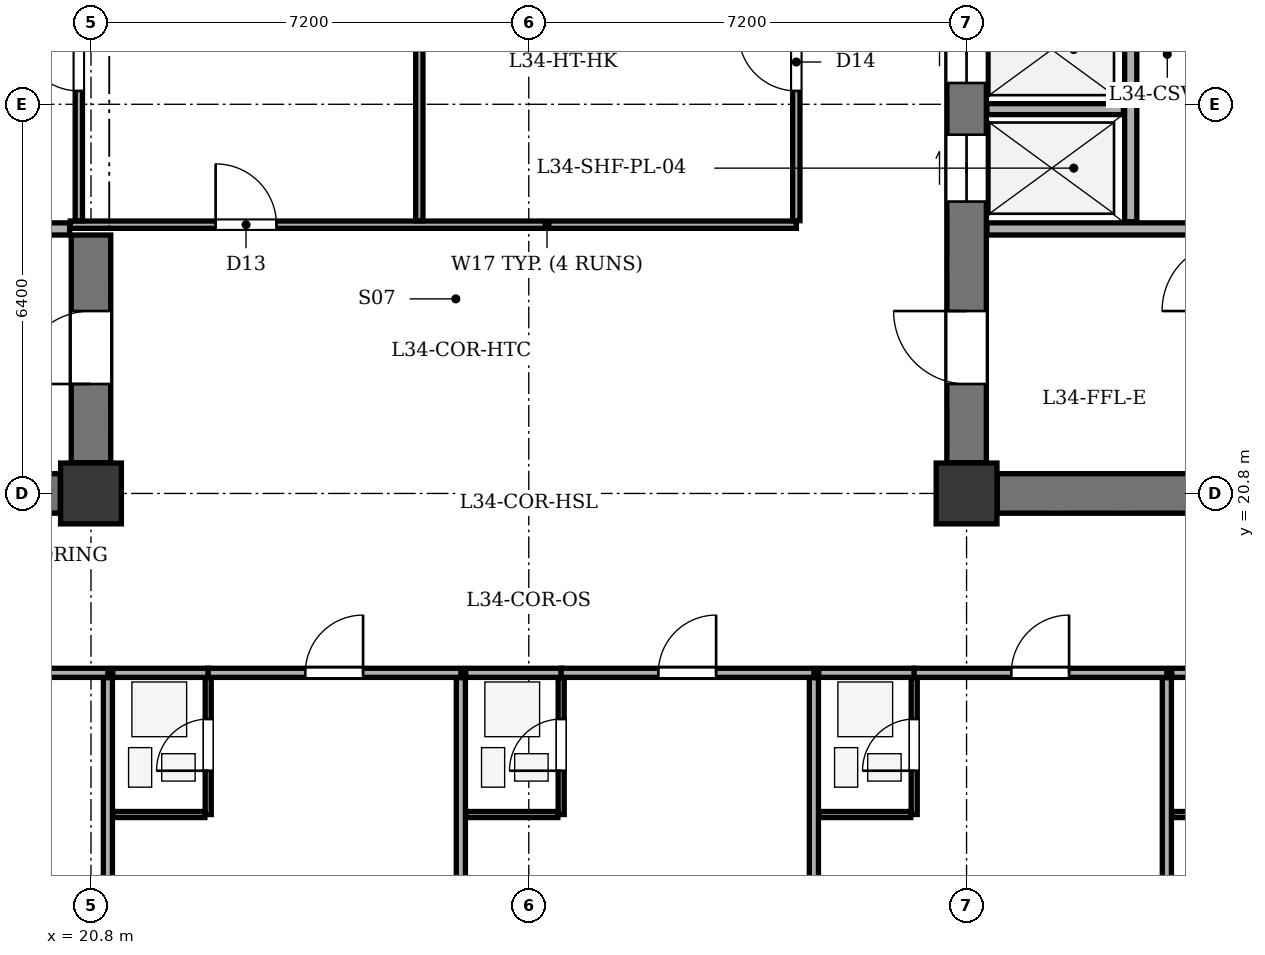
"""IFC4 building model, lengths in metres.
Left out: names, types, materials, properties, quantities, classifications, styles, units other than length and angle.
Written with IfcOpenShell. Run it as: python <this file> out.ifc"""

import sys

from ifc_helpers import new_model, si_unit, direction, frame, frame_2d, origin, origin_2d, place, context, subcontext, project, spatial, rectangle, extrude, element, fill, save


model = new_model("IFC4")
c1 = context("Model", 3, precision=1e-05, world=origin(), true_north=direction((0.0, 1.0)))
c2 = subcontext(c1, "Body", "Model", "MODEL_VIEW")
j1 = project(units=[si_unit("LENGTHUNIT", "METRE"), si_unit("PLANEANGLEUNIT", "RADIAN")], contexts=[c1])
p1 = place(None, origin())
s1 = spatial("IfcSite", under=j1, at=p1, CompositionType="ELEMENT")
p2 = place(p1, origin())
s2 = spatial("IfcBuilding", under=s1, at=p2, CompositionType="ELEMENT")
p3 = place(p2, frame((0.0, 0.0, 137.8)))
s3 = spatial("IfcBuildingStorey", under=s2, at=p3, CompositionType="ELEMENT", Elevation=137.8)
for number, where, z_axis, x_axis in (
    (1, (20.8, 20.8, 0.0), (0.0, 0.0, 1.0), (1.0, 0.0, 0.0)),
    (2, (35.2, 20.8, 0.0), (0.0, 0.0, 1.0), (1.0, 0.0, 0.0)),
):
    element("IfcColumn", number, at=place(p3, frame(where, z_axis=z_axis, x_axis=x_axis)), inside=s3, PredefinedType="COLUMN", context=c2, shape_type="SweptSolid", body=[
        extrude(rectangle(XDim=1.0, YDim=1.0, at=origin_2d()), origin(), (0.0, 0.0, 1.0), 3.5),
    ])
p4 = place(p3, frame((13.305, 20.8, 0.0), z_axis=(0.0, 0.0, 1.0), x_axis=(1.0, 0.0, 0.0)))
e3 = element("IfcWall", 3, at=p4, inside=s3, PredefinedType="SHEAR", context=c2, shape_type="SweptSolid", body=[
    extrude(rectangle(XDim=6.99, YDim=0.65, at=frame_2d((3.495, 0.0))), origin(), (0.0, 0.0, 1.0), 3.05),
])
p5 = place(p3, frame((20.8, 21.305, 0.0), z_axis=(0.0, 0.0, 1.0), x_axis=(0.0, 1.0, 0.0)))
e4 = element("IfcWall", 4, at=p5, inside=s3, PredefinedType="SHEAR", context=c2, shape_type="SweptSolid", body=[
    extrude(rectangle(XDim=3.745, YDim=0.65, at=frame_2d((1.873, 0.0))), origin(), (0.0, 0.0, 1.0), 3.05),
])
p6 = place(p5, frame((1.295, 0.0, 0.0)))
e5 = element("IfcOpeningElement", 5, at=p6, cuts=e4, PredefinedType="OPENING", context=c2, shape_type="SweptSolid", body=[
    extrude(rectangle(XDim=1.2, YDim=2.15, at=frame_2d((0.6, 1.075))), frame((0.0, 0.335, 0.0), z_axis=(0.0, -1.0, 0.0), x_axis=(1.0, 0.0, 0.0)), (0.0, 0.0, 1.0), 0.67),
])
p7 = place(p3, frame((16.6, 25.15, 0.0), z_axis=(0.0, 0.0, 1.0), x_axis=(1.0, 0.0, 0.0)))
e6 = element("IfcWall", 6, at=p7, inside=s3, PredefinedType="SOLIDWALL", context=c2, shape_type="SweptSolid", body=[
    extrude(rectangle(XDim=3.85, YDim=0.2, at=frame_2d((1.925, 0.0))), origin(), (0.0, 0.0, 1.0), 3.05),
])
p8 = place(p3, frame((35.705, 20.8, 0.0), z_axis=(0.0, 0.0, 1.0), x_axis=(1.0, 0.0, 0.0)))
e7 = element("IfcWall", 7, at=p8, inside=s3, PredefinedType="SHEAR", context=c2, shape_type="SweptSolid", body=[
    extrude(rectangle(XDim=6.99, YDim=0.65, at=frame_2d((3.495, 0.0))), origin(), (0.0, 0.0, 1.0), 3.05),
])
p9 = place(p3, frame((35.2, 21.305, 0.0), z_axis=(0.0, 0.0, 1.0), x_axis=(0.0, 1.0, 0.0)))
e8 = element("IfcWall", 8, at=p9, inside=s3, PredefinedType="SHEAR", context=c2, shape_type="SweptSolid", body=[
    extrude(rectangle(XDim=11.79, YDim=0.65, at=frame_2d((5.895, 0.0))), origin(), (0.0, 0.0, 1.0), 3.05),
])
p10 = place(p9, frame((1.295, 0.0, 0.0)))
e9 = element("IfcOpeningElement", 9, at=p10, cuts=e8, PredefinedType="OPENING", context=c2, shape_type="SweptSolid", body=[
    extrude(rectangle(XDim=1.2, YDim=2.15, at=frame_2d((0.6, 1.075))), frame((0.0, 0.335, 0.0), z_axis=(0.0, -1.0, 0.0), x_axis=(1.0, 0.0, 0.0)), (0.0, 0.0, 1.0), 0.67),
])
p11 = place(p9, frame((4.295, 0.0, 0.0)))
e10 = element("IfcOpeningElement", 10, at=p11, cuts=e8, PredefinedType="OPENING", context=c2, shape_type="SweptSolid", body=[
    extrude(rectangle(XDim=1.1, YDim=2.1, at=frame_2d((0.55, 1.05))), frame((0.0, 0.335, 0.0), z_axis=(0.0, -1.0, 0.0), x_axis=(1.0, 0.0, 0.0)), (0.0, 0.0, 1.0), 0.67),
])
p12 = place(p9, frame((6.245, 0.0, 0.0)))
e11 = element("IfcOpeningElement", 11, at=p12, cuts=e8, PredefinedType="OPENING", context=c2, shape_type="SweptSolid", body=[
    extrude(rectangle(XDim=1.1, YDim=2.1, at=frame_2d((0.55, 1.05))), frame((0.0, 0.335, 0.0), z_axis=(0.0, -1.0, 0.0), x_axis=(1.0, 0.0, 0.0)), (0.0, 0.0, 1.0), 0.67),
])
p13 = place(p9, frame((8.195, 0.0, 0.0)))
e12 = element("IfcOpeningElement", 12, at=p13, cuts=e8, PredefinedType="OPENING", context=c2, shape_type="SweptSolid", body=[
    extrude(rectangle(XDim=1.1, YDim=2.1, at=frame_2d((0.55, 1.05))), frame((0.0, 0.335, 0.0), z_axis=(0.0, -1.0, 0.0), x_axis=(1.0, 0.0, 0.0)), (0.0, 0.0, 1.0), 0.67),
])
p14 = place(p3, frame((35.535, 25.15, 0.0), z_axis=(0.0, 0.0, 1.0), x_axis=(1.0, 0.0, 0.0)))
e13 = element("IfcWall", 13, at=p14, inside=s3, PredefinedType="SOLIDWALL", context=c2, shape_type="SweptSolid", body=[
    extrude(rectangle(XDim=3.865, YDim=0.2, at=frame_2d((1.933, 0.0))), origin(), (0.0, 0.0, 1.0), 3.05),
])
p15 = place(p3, frame((37.9, 25.27, 0.0), z_axis=(0.0, 0.0, 1.0), x_axis=(0.0, 1.0, 0.0)))
e14 = element("IfcWall", 14, at=p15, inside=s3, PredefinedType="SOLIDWALL", context=c2, shape_type="SweptSolid", body=[
    extrude(rectangle(XDim=7.995, YDim=0.2, at=frame_2d((3.998, 0.0))), origin(), (0.0, 0.0, 1.0), 3.05),
])
p16 = place(p3, frame((35.535, 27.12, 0.0), z_axis=(0.0, 0.0, 1.0), x_axis=(1.0, 0.0, 0.0)))
e15 = element("IfcWall", 15, at=p16, inside=s3, PredefinedType="PARTITIONING", context=c2, shape_type="SweptSolid", body=[
    extrude(rectangle(XDim=2.245, YDim=0.18, at=frame_2d((1.123, 0.0))), origin(), (0.0, 0.0, 1.0), 3.05),
])
p17 = place(p3, frame((20.46, 25.22, 0.0), z_axis=(0.0, 0.0, 1.0), x_axis=(1.0, 0.0, 0.0)))
e16 = element("IfcWall", 16, at=p17, inside=s3, PredefinedType="PARTITIONING", context=c2, shape_type="SweptSolid", body=[
    extrude(rectangle(XDim=11.94, YDim=0.12, at=frame_2d((5.97, 0.0))), origin(), (0.0, 0.0, 1.0), 3.05),
])
p18 = place(p17, frame((2.39, 0.0, 0.0)))
e17 = element("IfcOpeningElement", 17, at=p18, cuts=e16, PredefinedType="OPENING", context=c2, shape_type="SweptSolid", body=[
    extrude(rectangle(XDim=1.0, YDim=2.1, at=frame_2d((0.5, 1.05))), frame((0.0, 0.07, 0.0), z_axis=(0.0, -1.0, 0.0), x_axis=(1.0, 0.0, 0.0)), (0.0, 0.0, 1.0), 0.14),
])
p19 = place(p3, frame((32.4, 25.285, 0.0), z_axis=(0.0, 0.0, 1.0), x_axis=(0.0, 1.0, 0.0)))
e18 = element("IfcWall", 18, at=p19, inside=s3, PredefinedType="PARTITIONING", context=c2, shape_type="SweptSolid", body=[
    extrude(rectangle(XDim=5.67, YDim=0.12, at=frame_2d((2.835, 0.0))), origin(), (0.0, 0.0, 1.0), 3.05),
])
p20 = place(p19, frame((2.135, 0.0, 0.0)))
e19 = element("IfcOpeningElement", 19, at=p20, cuts=e18, PredefinedType="OPENING", context=c2, shape_type="SweptSolid", body=[
    extrude(rectangle(XDim=0.95, YDim=2.1, at=frame_2d((0.475, 1.05))), frame((0.0, 0.07, 0.0), z_axis=(0.0, -1.0, 0.0), x_axis=(1.0, 0.0, 0.0)), (0.0, 0.0, 1.0), 0.14),
])
p21 = place(p3, frame((20.6, 25.285, 0.0), z_axis=(0.0, 0.0, 1.0), x_axis=(0.0, 1.0, 0.0)))
e20 = element("IfcWall", 20, at=p21, inside=s3, PredefinedType="PARTITIONING", context=c2, shape_type="SweptSolid", body=[
    extrude(rectangle(XDim=5.67, YDim=0.12, at=frame_2d((2.835, 0.0))), origin(), (0.0, 0.0, 1.0), 2.585),
])
p22 = place(p21, frame((2.135, 0.0, 0.0)))
e21 = element("IfcOpeningElement", 21, at=p22, cuts=e20, PredefinedType="OPENING", context=c2, shape_type="SweptSolid", body=[
    extrude(rectangle(XDim=0.95, YDim=2.1, at=frame_2d((0.475, 1.05))), frame((0.0, 0.07, 0.0), z_axis=(0.0, -1.0, 0.0), x_axis=(1.0, 0.0, 0.0)), (0.0, 0.0, 1.0), 0.14),
])
p23 = place(p3, frame((26.2, 25.285, 0.0), z_axis=(0.0, 0.0, 1.0), x_axis=(0.0, 1.0, 0.0)))
e22 = element("IfcWall", 22, at=p23, inside=s3, PredefinedType="PARTITIONING", context=c2, shape_type="SweptSolid", body=[
    extrude(rectangle(XDim=5.67, YDim=0.12, at=frame_2d((2.835, 0.0))), origin(), (0.0, 0.0, 1.0), 3.05),
])
p24 = place(p3, frame((17.264, 17.85, 0.0), z_axis=(0.0, 0.0, 1.0), x_axis=(1.0, 0.0, 0.0)))
e23 = element("IfcWall", 23, at=p24, inside=s3, PredefinedType="PARTITIONING", context=c2, shape_type="SweptSolid", body=[
    extrude(rectangle(XDim=3.814, YDim=0.15, at=frame_2d((1.907, 0.0))), origin(), (0.0, 0.0, 1.0), 3.05),
])
p25 = place(p24, frame((1.427, 0.0, 0.0)))
e24 = element("IfcOpeningElement", 24, at=p25, cuts=e23, PredefinedType="OPENING", context=c2, shape_type="SweptSolid", body=[
    extrude(rectangle(XDim=0.95, YDim=2.1, at=frame_2d((0.475, 1.05))), frame((0.0, 0.085, 0.0), z_axis=(0.0, -1.0, 0.0), x_axis=(1.0, 0.0, 0.0)), (0.0, 0.0, 1.0), 0.17),
])
p26 = place(p3, frame((21.078, 1.875, 0.0), z_axis=(0.0, 0.0, 1.0), x_axis=(0.0, 1.0, 0.0)))
e25 = element("IfcWall", 25, at=p26, inside=s3, PredefinedType="PARTITIONING", context=c2, shape_type="SweptSolid", body=[
    extrude(rectangle(XDim=15.895, YDim=0.15, at=frame_2d((7.948, 0.0))), origin(), (0.0, 0.0, 1.0), 3.05),
])
p27 = place(p3, frame((21.158, 17.85, 0.0), z_axis=(0.0, 0.0, 1.0), x_axis=(1.0, 0.0, 0.0)))
e26 = element("IfcWall", 26, at=p27, inside=s3, PredefinedType="PARTITIONING", context=c2, shape_type="SweptSolid", body=[
    extrude(rectangle(XDim=1.57, YDim=0.15, at=frame_2d((0.785, 0.0))), origin(), (0.0, 0.0, 1.0), 3.05),
])
p28 = place(p3, frame((22.728, 17.85, 0.0), z_axis=(0.0, 0.0, 1.0), x_axis=(1.0, 0.0, 0.0)))
e27 = element("IfcWall", 27, at=p28, inside=s3, PredefinedType="PARTITIONING", context=c2, shape_type="SweptSolid", body=[
    extrude(rectangle(XDim=4.155, YDim=0.15, at=frame_2d((2.078, 0.0))), origin(), (0.0, 0.0, 1.0), 3.05),
])
p29 = place(p28, frame((1.597, 0.0, 0.0)))
e28 = element("IfcOpeningElement", 28, at=p29, cuts=e27, PredefinedType="OPENING", context=c2, shape_type="SweptSolid", body=[
    extrude(rectangle(XDim=0.95, YDim=2.1, at=frame_2d((0.475, 1.05))), frame((0.0, 0.085, 0.0), z_axis=(0.0, -1.0, 0.0), x_axis=(1.0, 0.0, 0.0)), (0.0, 0.0, 1.0), 0.17),
])
p30 = place(p3, frame((22.728, 15.52, 0.0), z_axis=(0.0, 0.0, 1.0), x_axis=(0.0, 1.0, 0.0)))
e29 = element("IfcWall", 29, at=p30, inside=s3, PredefinedType="PARTITIONING", context=c2, shape_type="SweptSolid", body=[
    extrude(rectangle(XDim=2.25, YDim=0.1, at=frame_2d((1.125, 0.0))), origin(), (0.0, 0.0, 1.0), 3.05),
])
p31 = place(p30, frame((0.72, 0.0, 0.0)))
e30 = element("IfcOpeningElement", 30, at=p31, cuts=e29, PredefinedType="OPENING", context=c2, shape_type="SweptSolid", body=[
    extrude(rectangle(XDim=0.85, YDim=2.05, at=frame_2d((0.425, 1.025))), frame((0.0, 0.06, 0.0), z_axis=(0.0, -1.0, 0.0), x_axis=(1.0, 0.0, 0.0)), (0.0, 0.0, 1.0), 0.12),
])
p32 = place(p3, frame((21.158, 15.52, 0.0), z_axis=(0.0, 0.0, 1.0), x_axis=(1.0, 0.0, 0.0)))
e31 = element("IfcWall", 31, at=p32, inside=s3, PredefinedType="PARTITIONING", context=c2, shape_type="SweptSolid", body=[
    extrude(rectangle(XDim=1.515, YDim=0.1, at=frame_2d((0.758, 0.0))), origin(), (0.0, 0.0, 1.0), 3.05),
])
p33 = place(p3, frame((26.883, 1.875, 0.0), z_axis=(0.0, 0.0, 1.0), x_axis=(0.0, 1.0, 0.0)))
e32 = element("IfcWall", 32, at=p33, inside=s3, PredefinedType="PARTITIONING", context=c2, shape_type="SweptSolid", body=[
    extrude(rectangle(XDim=15.895, YDim=0.15, at=frame_2d((7.948, 0.0))), origin(), (0.0, 0.0, 1.0), 3.05),
])
p34 = place(p3, frame((26.963, 17.85, 0.0), z_axis=(0.0, 0.0, 1.0), x_axis=(1.0, 0.0, 0.0)))
e33 = element("IfcWall", 33, at=p34, inside=s3, PredefinedType="PARTITIONING", context=c2, shape_type="SweptSolid", body=[
    extrude(rectangle(XDim=1.57, YDim=0.15, at=frame_2d((0.785, 0.0))), origin(), (0.0, 0.0, 1.0), 3.05),
])
p35 = place(p3, frame((28.533, 17.85, 0.0), z_axis=(0.0, 0.0, 1.0), x_axis=(1.0, 0.0, 0.0)))
e34 = element("IfcWall", 34, at=p35, inside=s3, PredefinedType="PARTITIONING", context=c2, shape_type="SweptSolid", body=[
    extrude(rectangle(XDim=4.156, YDim=0.15, at=frame_2d((2.078, 0.0))), origin(), (0.0, 0.0, 1.0), 3.05),
])
p36 = place(p35, frame((1.598, 0.0, 0.0)))
e35 = element("IfcOpeningElement", 35, at=p36, cuts=e34, PredefinedType="OPENING", context=c2, shape_type="SweptSolid", body=[
    extrude(rectangle(XDim=0.95, YDim=2.1, at=frame_2d((0.475, 1.05))), frame((0.0, 0.085, 0.0), z_axis=(0.0, -1.0, 0.0), x_axis=(1.0, 0.0, 0.0)), (0.0, 0.0, 1.0), 0.17),
])
p37 = place(p3, frame((28.533, 15.52, 0.0), z_axis=(0.0, 0.0, 1.0), x_axis=(0.0, 1.0, 0.0)))
e36 = element("IfcWall", 36, at=p37, inside=s3, PredefinedType="PARTITIONING", context=c2, shape_type="SweptSolid", body=[
    extrude(rectangle(XDim=2.25, YDim=0.1, at=frame_2d((1.125, 0.0))), origin(), (0.0, 0.0, 1.0), 3.05),
])
p38 = place(p37, frame((0.72, 0.0, 0.0)))
e37 = element("IfcOpeningElement", 37, at=p38, cuts=e36, PredefinedType="OPENING", context=c2, shape_type="SweptSolid", body=[
    extrude(rectangle(XDim=0.85, YDim=2.05, at=frame_2d((0.425, 1.025))), frame((0.0, 0.06, 0.0), z_axis=(0.0, -1.0, 0.0), x_axis=(1.0, 0.0, 0.0)), (0.0, 0.0, 1.0), 0.12),
])
p39 = place(p3, frame((26.963, 15.52, 0.0), z_axis=(0.0, 0.0, 1.0), x_axis=(1.0, 0.0, 0.0)))
e38 = element("IfcWall", 38, at=p39, inside=s3, PredefinedType="PARTITIONING", context=c2, shape_type="SweptSolid", body=[
    extrude(rectangle(XDim=1.515, YDim=0.1, at=frame_2d((0.758, 0.0))), origin(), (0.0, 0.0, 1.0), 3.05),
])
p40 = place(p3, frame((32.689, 1.875, 0.0), z_axis=(0.0, 0.0, 1.0), x_axis=(0.0, 1.0, 0.0)))
e39 = element("IfcWall", 39, at=p40, inside=s3, PredefinedType="PARTITIONING", context=c2, shape_type="SweptSolid", body=[
    extrude(rectangle(XDim=15.895, YDim=0.15, at=frame_2d((7.948, 0.0))), origin(), (0.0, 0.0, 1.0), 3.05),
])
p41 = place(p3, frame((32.769, 17.85, 0.0), z_axis=(0.0, 0.0, 1.0), x_axis=(1.0, 0.0, 0.0)))
e40 = element("IfcWall", 40, at=p41, inside=s3, PredefinedType="PARTITIONING", context=c2, shape_type="SweptSolid", body=[
    extrude(rectangle(XDim=1.57, YDim=0.15, at=frame_2d((0.785, 0.0))), origin(), (0.0, 0.0, 1.0), 3.05),
])
p42 = place(p3, frame((34.339, 17.85, 0.0), z_axis=(0.0, 0.0, 1.0), x_axis=(1.0, 0.0, 0.0)))
e41 = element("IfcWall", 41, at=p42, inside=s3, PredefinedType="PARTITIONING", context=c2, shape_type="SweptSolid", body=[
    extrude(rectangle(XDim=4.155, YDim=0.15, at=frame_2d((2.077, 0.0))), origin(), (0.0, 0.0, 1.0), 3.05),
])
p43 = place(p42, frame((1.597, 0.0, 0.0)))
e42 = element("IfcOpeningElement", 42, at=p43, cuts=e41, PredefinedType="OPENING", context=c2, shape_type="SweptSolid", body=[
    extrude(rectangle(XDim=0.95, YDim=2.1, at=frame_2d((0.475, 1.05))), frame((0.0, 0.085, 0.0), z_axis=(0.0, -1.0, 0.0), x_axis=(1.0, 0.0, 0.0)), (0.0, 0.0, 1.0), 0.17),
])
p44 = place(p3, frame((34.339, 15.52, 0.0), z_axis=(0.0, 0.0, 1.0), x_axis=(0.0, 1.0, 0.0)))
e43 = element("IfcWall", 43, at=p44, inside=s3, PredefinedType="PARTITIONING", context=c2, shape_type="SweptSolid", body=[
    extrude(rectangle(XDim=2.25, YDim=0.1, at=frame_2d((1.125, 0.0))), origin(), (0.0, 0.0, 1.0), 3.05),
])
p45 = place(p44, frame((0.72, 0.0, 0.0)))
e44 = element("IfcOpeningElement", 44, at=p45, cuts=e43, PredefinedType="OPENING", context=c2, shape_type="SweptSolid", body=[
    extrude(rectangle(XDim=0.85, YDim=2.05, at=frame_2d((0.425, 1.025))), frame((0.0, 0.06, 0.0), z_axis=(0.0, -1.0, 0.0), x_axis=(1.0, 0.0, 0.0)), (0.0, 0.0, 1.0), 0.12),
])
p46 = place(p3, frame((32.769, 15.52, 0.0), z_axis=(0.0, 0.0, 1.0), x_axis=(1.0, 0.0, 0.0)))
e45 = element("IfcWall", 45, at=p46, inside=s3, PredefinedType="PARTITIONING", context=c2, shape_type="SweptSolid", body=[
    extrude(rectangle(XDim=1.515, YDim=0.1, at=frame_2d((0.757, 0.0))), origin(), (0.0, 0.0, 1.0), 3.05),
])
p47 = place(p3, frame((38.494, 1.875, 0.0), z_axis=(0.0, 0.0, 1.0), x_axis=(0.0, 1.0, 0.0)))
e46 = element("IfcWall", 46, at=p47, inside=s3, PredefinedType="PARTITIONING", context=c2, shape_type="SweptSolid", body=[
    extrude(rectangle(XDim=15.895, YDim=0.15, at=frame_2d((7.948, 0.0))), origin(), (0.0, 0.0, 1.0), 2.485),
])
p48 = place(p3, frame((38.574, 17.85, 0.0), z_axis=(0.0, 0.0, 1.0), x_axis=(1.0, 0.0, 0.0)))
e47 = element("IfcWall", 47, at=p48, inside=s3, PredefinedType="PARTITIONING", context=c2, shape_type="SweptSolid", body=[
    extrude(rectangle(XDim=1.57, YDim=0.15, at=frame_2d((0.785, 0.0))), origin(), (0.0, 0.0, 1.0), 3.05),
])
p49 = place(p3, frame((38.574, 15.52, 0.0), z_axis=(0.0, 0.0, 1.0), x_axis=(1.0, 0.0, 0.0)))
e48 = element("IfcWall", 48, at=p49, inside=s3, PredefinedType="PARTITIONING", context=c2, shape_type="SweptSolid", body=[
    extrude(rectangle(XDim=1.515, YDim=0.1, at=frame_2d((0.758, 0.0))), origin(), (0.0, 0.0, 1.0), 3.05),
])
p50 = place(p6, origin())
e49 = element("IfcDoor", 49, at=p50, inside=s3, OperationType="SINGLE_SWING_LEFT", PredefinedType="DOOR", context=c2, shape_type="SweptSolid", body=[
    extrude(rectangle(XDim=1.2, YDim=2.15, at=frame_2d((0.6, 1.075))), frame((0.0, 0.025, 0.0), z_axis=(0.0, -1.0, 0.0), x_axis=(1.0, 0.0, 0.0)), (0.0, 0.0, 1.0), 0.05),
])
fill(e5, e49)
p51 = place(p10, origin())
e50 = element("IfcDoor", 50, at=p51, inside=s3, OperationType="SINGLE_SWING_RIGHT", PredefinedType="DOOR", context=c2, shape_type="SweptSolid", body=[
    extrude(rectangle(XDim=1.2, YDim=2.15, at=frame_2d((0.6, 1.075))), frame((0.0, 0.025, 0.0), z_axis=(0.0, -1.0, 0.0), x_axis=(1.0, 0.0, 0.0)), (0.0, 0.0, 1.0), 0.05),
])
fill(e9, e50)
p52 = place(p11, origin())
e51 = element("IfcDoor", 51, at=p52, inside=s3, OperationType="DOUBLE_DOOR_SLIDING", PredefinedType="DOOR", context=c2, shape_type="SweptSolid", body=[
    extrude(rectangle(XDim=1.1, YDim=2.1, at=frame_2d((0.55, 1.05))), frame((0.0, 0.025, 0.0), z_axis=(0.0, -1.0, 0.0), x_axis=(1.0, 0.0, 0.0)), (0.0, 0.0, 1.0), 0.05),
])
fill(e10, e51)
p53 = place(p12, origin())
e52 = element("IfcDoor", 52, at=p53, inside=s3, OperationType="DOUBLE_DOOR_SLIDING", PredefinedType="DOOR", context=c2, shape_type="SweptSolid", body=[
    extrude(rectangle(XDim=1.1, YDim=2.1, at=frame_2d((0.55, 1.05))), frame((0.0, 0.025, 0.0), z_axis=(0.0, -1.0, 0.0), x_axis=(1.0, 0.0, 0.0)), (0.0, 0.0, 1.0), 0.05),
])
fill(e11, e52)
p54 = place(p22, origin())
e53 = element("IfcDoor", 53, at=p54, inside=s3, OperationType="SINGLE_SWING_RIGHT", PredefinedType="DOOR", context=c2, shape_type="SweptSolid", body=[
    extrude(rectangle(XDim=0.95, YDim=2.1, at=frame_2d((0.475, 1.05))), frame((0.0, 0.025, 0.0), z_axis=(0.0, -1.0, 0.0), x_axis=(1.0, 0.0, 0.0)), (0.0, 0.0, 1.0), 0.05),
])
fill(e21, e53)
p55 = place(p18, origin())
e54 = element("IfcDoor", 54, at=p55, inside=s3, OperationType="SINGLE_SWING_LEFT", PredefinedType="DOOR", context=c2, shape_type="SweptSolid", body=[
    extrude(rectangle(XDim=1.0, YDim=2.1, at=frame_2d((0.5, 1.05))), frame((0.0, 0.025, 0.0), z_axis=(0.0, -1.0, 0.0), x_axis=(1.0, 0.0, 0.0)), (0.0, 0.0, 1.0), 0.05),
])
fill(e17, e54)
p56 = place(p20, origin())
e55 = element("IfcDoor", 55, at=p56, inside=s3, OperationType="SINGLE_SWING_RIGHT", PredefinedType="DOOR", context=c2, shape_type="SweptSolid", body=[
    extrude(rectangle(XDim=0.95, YDim=2.1, at=frame_2d((0.475, 1.05))), frame((0.0, 0.025, 0.0), z_axis=(0.0, -1.0, 0.0), x_axis=(1.0, 0.0, 0.0)), (0.0, 0.0, 1.0), 0.05),
])
fill(e19, e55)
p57 = place(p31, origin())
e56 = element("IfcDoor", 56, at=p57, inside=s3, OperationType="SINGLE_SWING_LEFT", PredefinedType="DOOR", context=c2, shape_type="SweptSolid", body=[
    extrude(rectangle(XDim=0.85, YDim=2.05, at=frame_2d((0.425, 1.025))), frame((0.0, 0.025, 0.0), z_axis=(0.0, -1.0, 0.0), x_axis=(1.0, 0.0, 0.0)), (0.0, 0.0, 1.0), 0.05),
])
fill(e30, e56)
p58 = place(p29, origin())
e57 = element("IfcDoor", 57, at=p58, inside=s3, OperationType="SINGLE_SWING_RIGHT", PredefinedType="DOOR", context=c2, shape_type="SweptSolid", body=[
    extrude(rectangle(XDim=0.95, YDim=2.1, at=frame_2d((0.475, 1.05))), frame((0.0, 0.025, 0.0), z_axis=(0.0, -1.0, 0.0), x_axis=(1.0, 0.0, 0.0)), (0.0, 0.0, 1.0), 0.05),
])
fill(e28, e57)
p59 = place(p38, origin())
e58 = element("IfcDoor", 58, at=p59, inside=s3, OperationType="SINGLE_SWING_LEFT", PredefinedType="DOOR", context=c2, shape_type="SweptSolid", body=[
    extrude(rectangle(XDim=0.85, YDim=2.05, at=frame_2d((0.425, 1.025))), frame((0.0, 0.025, 0.0), z_axis=(0.0, -1.0, 0.0), x_axis=(1.0, 0.0, 0.0)), (0.0, 0.0, 1.0), 0.05),
])
fill(e37, e58)
p60 = place(p36, origin())
e59 = element("IfcDoor", 59, at=p60, inside=s3, OperationType="SINGLE_SWING_RIGHT", PredefinedType="DOOR", context=c2, shape_type="SweptSolid", body=[
    extrude(rectangle(XDim=0.95, YDim=2.1, at=frame_2d((0.475, 1.05))), frame((0.0, 0.025, 0.0), z_axis=(0.0, -1.0, 0.0), x_axis=(1.0, 0.0, 0.0)), (0.0, 0.0, 1.0), 0.05),
])
fill(e35, e59)
p61 = place(p45, origin())
e60 = element("IfcDoor", 60, at=p61, inside=s3, OperationType="SINGLE_SWING_LEFT", PredefinedType="DOOR", context=c2, shape_type="SweptSolid", body=[
    extrude(rectangle(XDim=0.85, YDim=2.05, at=frame_2d((0.425, 1.025))), frame((0.0, 0.025, 0.0), z_axis=(0.0, -1.0, 0.0), x_axis=(1.0, 0.0, 0.0)), (0.0, 0.0, 1.0), 0.05),
])
fill(e44, e60)
p62 = place(p43, origin())
e61 = element("IfcDoor", 61, at=p62, inside=s3, OperationType="SINGLE_SWING_RIGHT", PredefinedType="DOOR", context=c2, shape_type="SweptSolid", body=[
    extrude(rectangle(XDim=0.95, YDim=2.1, at=frame_2d((0.475, 1.05))), frame((0.0, 0.025, 0.0), z_axis=(0.0, -1.0, 0.0), x_axis=(1.0, 0.0, 0.0)), (0.0, 0.0, 1.0), 0.05),
])
fill(e42, e61)
save(model, sys.argv[1])
